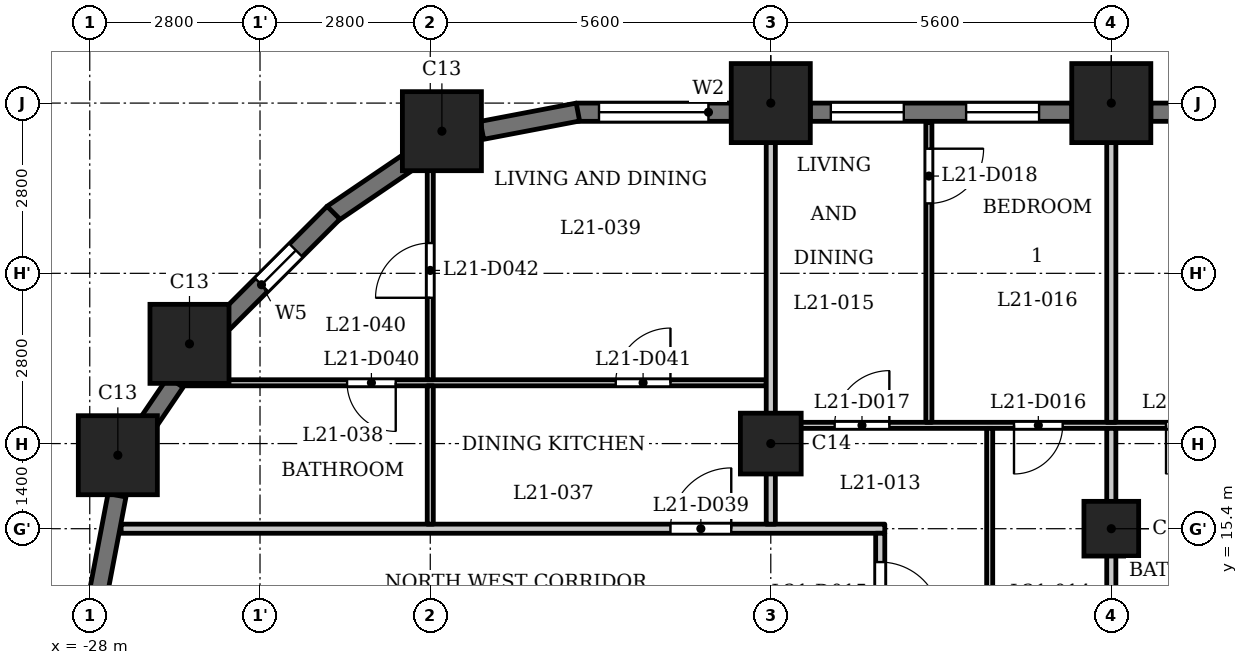
"""IFC4 building model, lengths in metres.
Left out: names, types, materials, properties, quantities, classifications, styles, units other than length and angle.
Written with IfcOpenShell. Run it as: python <this file> out.ifc"""

import sys

from ifc_helpers import new_model, si_unit, direction, frame, frame_2d, origin, origin_2d, place, context, subcontext, project, spatial, rectangle, extrude, element, fill, save


model = new_model("IFC4")
c1 = context("Model", 3, precision=1e-05, world=origin(), true_north=direction((0.0, 1.0)))
c2 = subcontext(c1, "Body", "Model", "MODEL_VIEW")
j1 = project(units=[si_unit("LENGTHUNIT", "METRE"), si_unit("PLANEANGLEUNIT", "RADIAN")], contexts=[c1])
p1 = place(None, origin())
s1 = spatial("IfcSite", under=j1, at=p1, CompositionType="ELEMENT")
p2 = place(p1, origin())
s2 = spatial("IfcBuilding", under=s1, at=p2, CompositionType="ELEMENT")
p3 = place(p2, frame((0.0, 0.0, 86.8)))
s3 = spatial("IfcBuildingStorey", under=s2, at=p3, CompositionType="ELEMENT", Elevation=86.8)
for number, where, z_axis, x_axis in (
    (1, (-11.2, 22.4, 0.0), (0.0, 0.0, 1.0), (1.0, 0.0, 0.0)),
    (2, (-16.8, 22.4, 0.0), (0.0, 0.0, 1.0), (1.0, 0.0, 0.0)),
    (3, (-22.209, 21.938, 0.0), (0.0, 0.0, 1.0), (1.0, 0.0, 0.0)),
    (4, (-26.36, 18.44, 0.0), (0.0, 0.0, 1.0), (1.0, 0.0, 0.0)),
    (5, (-27.538, 16.609, 0.0), (0.0, 0.0, 1.0), (1.0, 0.0, 0.0)),
):
    element("IfcColumn", number, at=place(p3, frame(where, z_axis=z_axis, x_axis=x_axis)), inside=s3, PredefinedType="COLUMN", context=c2, shape_type="SweptSolid", body=[
        extrude(rectangle(XDim=1.3, YDim=1.3, at=origin_2d()), origin(), (0.0, 0.0, 1.0), 3.5),
    ])
p4 = place(p3, frame((-16.8, 16.8, 0.0), z_axis=(0.0, 0.0, 1.0), x_axis=(1.0, 0.0, 0.0)))
e6 = element("IfcColumn", 6, at=p4, inside=s3, PredefinedType="COLUMN", context=c2, shape_type="SweptSolid", body=[
    extrude(rectangle(XDim=1.0, YDim=1.0, at=origin_2d()), origin(), (0.0, 0.0, 1.0), 3.5),
])
p5 = place(p3, frame((-11.2, 15.4, 0.0), z_axis=(0.0, 0.0, 1.0), x_axis=(1.0, 0.0, 0.0)))
e7 = element("IfcColumn", 7, at=p5, inside=s3, PredefinedType="COLUMN", context=c2, shape_type="SweptSolid", body=[
    extrude(rectangle(XDim=0.9, YDim=0.9, at=origin_2d()), origin(), (0.0, 0.0, 1.0), 3.5),
])
p6 = place(p3, frame((-6.25, 22.25, 0.0), z_axis=(0.0, 0.0, 1.0), x_axis=(-1.0, 0.0, 0.0)))
e8 = element("IfcWall", 8, at=p6, inside=s3, PredefinedType="SOLIDWALL", context=c2, shape_type="SweptSolid", body=[
    extrude(rectangle(XDim=4.3, YDim=0.3, at=frame_2d((2.15, 0.0))), origin(), (0.0, 0.0, 1.0), 2.4),
])
p7 = place(p6, frame((0.35, 0.0, 1.2)))
e9 = element("IfcOpeningElement", 9, at=p7, cuts=e8, PredefinedType="OPENING", context=c2, shape_type="SweptSolid", body=[
    extrude(rectangle(XDim=3.6, YDim=0.95, at=frame_2d((1.8, 0.475))), frame((0.0, 0.16, 0.0), z_axis=(0.0, -1.0, 0.0), x_axis=(1.0, 0.0, 0.0)), (0.0, 0.0, 1.0), 0.32),
])
p8 = place(p3, frame((-11.85, 22.25, 0.0), z_axis=(0.0, 0.0, 1.0), x_axis=(-1.0, 0.0, 0.0)))
e10 = element("IfcWall", 10, at=p8, inside=s3, PredefinedType="SOLIDWALL", context=c2, shape_type="SweptSolid", body=[
    extrude(rectangle(XDim=4.3, YDim=0.3, at=frame_2d((2.15, 0.0))), origin(), (0.0, 0.0, 1.0), 2.4),
])
p9 = place(p8, frame((0.538, 0.0, 0.6)))
e11 = element("IfcOpeningElement", 11, at=p9, cuts=e10, PredefinedType="OPENING", context=c2, shape_type="SweptSolid", body=[
    extrude(rectangle(XDim=1.2, YDim=1.55, at=frame_2d((0.6, 0.775))), frame((0.0, 0.16, 0.0), z_axis=(0.0, -1.0, 0.0), x_axis=(1.0, 0.0, 0.0)), (0.0, 0.0, 1.0), 0.32),
])
p10 = place(p8, frame((2.762, 0.0, 0.6)))
e12 = element("IfcOpeningElement", 12, at=p10, cuts=e10, PredefinedType="OPENING", context=c2, shape_type="SweptSolid", body=[
    extrude(rectangle(XDim=1.2, YDim=1.55, at=frame_2d((0.6, 0.775))), frame((0.0, 0.16, 0.0), z_axis=(0.0, -1.0, 0.0), x_axis=(1.0, 0.0, 0.0)), (0.0, 0.0, 1.0), 0.32),
])
p11 = place(p3, frame((-17.45, 22.25, 0.0), z_axis=(0.0, 0.0, 1.0), x_axis=(-1.0, 0.0, 0.0)))
e13 = element("IfcWall", 13, at=p11, inside=s3, PredefinedType="SOLIDWALL", context=c2, shape_type="SweptSolid", body=[
    extrude(rectangle(XDim=2.55, YDim=0.3, at=frame_2d((1.275, 0.0))), origin(), (0.0, 0.0, 1.0), 2.4),
])
p12 = place(p11, frame((0.375, 0.0, 0.9)))
e14 = element("IfcOpeningElement", 14, at=p12, cuts=e13, PredefinedType="OPENING", context=c2, shape_type="SweptSolid", body=[
    extrude(rectangle(XDim=1.8, YDim=1.25, at=frame_2d((0.9, 0.625))), frame((0.0, 0.16, 0.0), z_axis=(0.0, -1.0, 0.0), x_axis=(1.0, 0.0, 0.0)), (0.0, 0.0, 1.0), 0.32),
])
for number, where, z_axis, x_axis in (
    (15, (-19.972, 22.253, 0.0), (0.0, 0.0, 1.0), (-0.982, -0.187, 0.0)),
    (16, (-22.684, 21.482, 0.0), (0.0, 0.0, 1.0), (-0.827, -0.562, 0.0)),
):
    element("IfcWall", number, at=place(p3, frame(where, z_axis=z_axis, x_axis=x_axis)), inside=s3, PredefinedType="SOLIDWALL", context=c2, shape_type="SweptSolid", body=[
        extrude(rectangle(XDim=1.606, YDim=0.3, at=frame_2d((0.803, 0.0))), origin(), (0.0, 0.0, 1.0), 2.4),
    ])
p13 = place(p3, frame((-23.991, 20.597, 0.0), z_axis=(0.0, 0.0, 1.0), x_axis=(-0.707106781187, -0.707106781187, 0.0)))
e17 = element("IfcWall", 17, at=p13, inside=s3, PredefinedType="SOLIDWALL", context=c2, shape_type="SweptSolid", body=[
    extrude(rectangle(XDim=2.55, YDim=0.3, at=frame_2d((1.275, 0.0))), origin(), (0.0, 0.0, 1.0), 2.4),
])
p14 = place(p13, frame((0.875, 0.0, 0.6)))
e18 = element("IfcOpeningElement", 18, at=p14, cuts=e17, PredefinedType="OPENING", context=c2, shape_type="SweptSolid", body=[
    extrude(rectangle(XDim=0.8, YDim=1.55, at=frame_2d((0.4, 0.775))), frame((0.0, 0.16, 0.0), z_axis=(0.0, -1.0, 0.0), x_axis=(1.0, 0.0, 0.0)), (0.0, 0.0, 1.0), 0.32),
])
p15 = place(p3, frame((-26.589, 17.81, 0.0), z_axis=(0.0, 0.0, 1.0), x_axis=(-0.562066330934, -0.827092159091, 0.0)))
e19 = element("IfcWall", 19, at=p15, inside=s3, PredefinedType="SOLIDWALL", context=c2, shape_type="SweptSolid", body=[
    extrude(rectangle(XDim=0.877, YDim=0.3, at=frame_2d((0.438, 0.0))), origin(), (0.0, 0.0, 1.0), 3.2),
])
p16 = place(p3, frame((-27.552, 15.949, 0.0), z_axis=(0.0, 0.0, 1.0), x_axis=(-0.187279751651, -0.982306619453, 0.0)))
e20 = element("IfcWall", 20, at=p16, inside=s3, PredefinedType="SOLIDWALL", context=c2, shape_type="SweptSolid", body=[
    extrude(rectangle(XDim=1.606, YDim=0.3, at=frame_2d((0.803, 0.0))), origin(), (0.0, 0.0, 1.0), 2.4),
])
p17 = place(p3, frame((-27.484, 15.4, 0.0), z_axis=(0.0, 0.0, 1.0), x_axis=(1.0, 0.0, 0.0)))
e21 = element("IfcWall", 21, at=p17, inside=s3, PredefinedType="PARTITIONING", context=c2, shape_type="SweptSolid", body=[
    extrude(rectangle(XDim=12.559, YDim=0.15, at=frame_2d((6.279, 0.0))), origin(), (0.0, 0.0, 1.0), 3.2),
])
p18 = place(p17, frame((9.034, 0.0, 0.0)))
e22 = element("IfcOpeningElement", 22, at=p18, cuts=e21, PredefinedType="OPENING", context=c2, shape_type="SweptSolid", body=[
    extrude(rectangle(XDim=1.0, YDim=2.1, at=frame_2d((0.5, 1.05))), frame((0.0, 0.085, 0.0), z_axis=(0.0, -1.0, 0.0), x_axis=(1.0, 0.0, 0.0)), (0.0, 0.0, 1.0), 0.17),
])
p19 = place(p3, frame((-16.725, 17.1, 0.0), z_axis=(0.0, 0.0, 1.0), x_axis=(1.0, 0.0, 0.0)))
e23 = element("IfcWall", 23, at=p19, inside=s3, PredefinedType="PARTITIONING", context=c2, shape_type="SweptSolid", body=[
    extrude(rectangle(XDim=33.45, YDim=0.1, at=frame_2d((16.725, 0.0))), origin(), (0.0, 0.0, 1.0), 3.2),
])
p20 = place(p19, frame((3.925, 0.0, 0.0)))
e24 = element("IfcOpeningElement", 24, at=p20, cuts=e23, PredefinedType="OPENING", context=c2, shape_type="SweptSolid", body=[
    extrude(rectangle(XDim=0.8, YDim=2.1, at=frame_2d((0.4, 1.05))), frame((0.0, 0.06, 0.0), z_axis=(0.0, -1.0, 0.0), x_axis=(1.0, 0.0, 0.0)), (0.0, 0.0, 1.0), 0.12),
])
p21 = place(p19, frame((0.975, 0.0, 0.0)))
e25 = element("IfcOpeningElement", 25, at=p21, cuts=e23, PredefinedType="OPENING", context=c2, shape_type="SweptSolid", body=[
    extrude(rectangle(XDim=0.9, YDim=2.1, at=frame_2d((0.45, 1.05))), frame((0.0, 0.06, 0.0), z_axis=(0.0, -1.0, 0.0), x_axis=(1.0, 0.0, 0.0)), (0.0, 0.0, 1.0), 0.12),
])
p22 = place(p19, frame((6.425, 0.0, 0.0)))
e26 = element("IfcOpeningElement", 26, at=p22, cuts=e23, PredefinedType="OPENING", context=c2, shape_type="SweptSolid", body=[
    extrude(rectangle(XDim=0.8, YDim=2.1, at=frame_2d((0.4, 1.05))), frame((0.0, 0.06, 0.0), z_axis=(0.0, -1.0, 0.0), x_axis=(1.0, 0.0, 0.0)), (0.0, 0.0, 1.0), 0.12),
])
p23 = place(p19, frame((8.825, 0.0, 0.0)))
e27 = element("IfcOpeningElement", 27, at=p23, cuts=e23, PredefinedType="OPENING", context=c2, shape_type="SweptSolid", body=[
    extrude(rectangle(XDim=0.9, YDim=2.1, at=frame_2d((0.45, 1.05))), frame((0.0, 0.06, 0.0), z_axis=(0.0, -1.0, 0.0), x_axis=(1.0, 0.0, 0.0)), (0.0, 0.0, 1.0), 0.12),
])
p24 = place(p19, frame((12.375, 0.0, 0.0)))
e28 = element("IfcOpeningElement", 28, at=p24, cuts=e23, PredefinedType="OPENING", context=c2, shape_type="SweptSolid", body=[
    extrude(rectangle(XDim=0.9, YDim=2.1, at=frame_2d((0.45, 1.05))), frame((0.0, 0.06, 0.0), z_axis=(0.0, -1.0, 0.0), x_axis=(1.0, 0.0, 0.0)), (0.0, 0.0, 1.0), 0.12),
])
p25 = place(p19, frame((14.425, 0.0, 0.0)))
e29 = element("IfcOpeningElement", 29, at=p25, cuts=e23, PredefinedType="OPENING", context=c2, shape_type="SweptSolid", body=[
    extrude(rectangle(XDim=0.9, YDim=2.1, at=frame_2d((0.45, 1.05))), frame((0.0, 0.06, 0.0), z_axis=(0.0, -1.0, 0.0), x_axis=(1.0, 0.0, 0.0)), (0.0, 0.0, 1.0), 0.12),
])
p26 = place(p19, frame((26.225, 0.0, 0.0)))
e30 = element("IfcOpeningElement", 30, at=p26, cuts=e23, PredefinedType="OPENING", context=c2, shape_type="SweptSolid", body=[
    extrude(rectangle(XDim=0.8, YDim=2.1, at=frame_2d((0.4, 1.05))), frame((0.0, 0.06, 0.0), z_axis=(0.0, -1.0, 0.0), x_axis=(1.0, 0.0, 0.0)), (0.0, 0.0, 1.0), 0.12),
])
p27 = place(p19, frame((23.025, 0.0, 0.0)))
e31 = element("IfcOpeningElement", 31, at=p27, cuts=e23, PredefinedType="OPENING", context=c2, shape_type="SweptSolid", body=[
    extrude(rectangle(XDim=0.9, YDim=2.1, at=frame_2d((0.45, 1.05))), frame((0.0, 0.06, 0.0), z_axis=(0.0, -1.0, 0.0), x_axis=(1.0, 0.0, 0.0)), (0.0, 0.0, 1.0), 0.12),
])
p28 = place(p19, frame((17.775, 0.0, 0.0)))
e32 = element("IfcOpeningElement", 32, at=p28, cuts=e23, PredefinedType="OPENING", context=c2, shape_type="SweptSolid", body=[
    extrude(rectangle(XDim=0.9, YDim=2.1, at=frame_2d((0.45, 1.05))), frame((0.0, 0.06, 0.0), z_axis=(0.0, -1.0, 0.0), x_axis=(1.0, 0.0, 0.0)), (0.0, 0.0, 1.0), 0.12),
])
p29 = place(p19, frame((20.025, 0.0, 0.0)))
e33 = element("IfcOpeningElement", 33, at=p29, cuts=e23, PredefinedType="OPENING", context=c2, shape_type="SweptSolid", body=[
    extrude(rectangle(XDim=0.9, YDim=2.1, at=frame_2d((0.45, 1.05))), frame((0.0, 0.06, 0.0), z_axis=(0.0, -1.0, 0.0), x_axis=(1.0, 0.0, 0.0)), (0.0, 0.0, 1.0), 0.12),
])
p30 = place(p19, frame((28.825, 0.0, 0.0)))
e34 = element("IfcOpeningElement", 34, at=p30, cuts=e23, PredefinedType="OPENING", context=c2, shape_type="SweptSolid", body=[
    extrude(rectangle(XDim=0.8, YDim=2.1, at=frame_2d((0.4, 1.05))), frame((0.0, 0.06, 0.0), z_axis=(0.0, -1.0, 0.0), x_axis=(1.0, 0.0, 0.0)), (0.0, 0.0, 1.0), 0.12),
])
p31 = place(p19, frame((31.975, 0.0, 0.0)))
e35 = element("IfcOpeningElement", 35, at=p31, cuts=e23, PredefinedType="OPENING", context=c2, shape_type="SweptSolid", body=[
    extrude(rectangle(XDim=0.9, YDim=2.1, at=frame_2d((0.45, 1.05))), frame((0.0, 0.06, 0.0), z_axis=(0.0, -1.0, 0.0), x_axis=(1.0, 0.0, 0.0)), (0.0, 0.0, 1.0), 0.12),
])
p32 = place(p3, frame((-26.554, 17.8, 0.0), z_axis=(0.0, 0.0, 1.0), x_axis=(1.0, 0.0, 0.0)))
e36 = element("IfcWall", 36, at=p32, inside=s3, PredefinedType="PARTITIONING", context=c2, shape_type="SweptSolid", body=[
    extrude(rectangle(XDim=9.679, YDim=0.1, at=frame_2d((4.84, 0.0))), origin(), (0.0, 0.0, 1.0), 3.2),
])
p33 = place(p32, frame((2.786, 0.0, 0.0)))
e37 = element("IfcOpeningElement", 37, at=p33, cuts=e36, PredefinedType="OPENING", context=c2, shape_type="SweptSolid", body=[
    extrude(rectangle(XDim=0.8, YDim=2.1, at=frame_2d((0.4, 1.05))), frame((0.0, 0.06, 0.0), z_axis=(0.0, -1.0, 0.0), x_axis=(1.0, 0.0, 0.0)), (0.0, 0.0, 1.0), 0.12),
])
p34 = place(p32, frame((7.204, 0.0, 0.0)))
e38 = element("IfcOpeningElement", 38, at=p34, cuts=e36, PredefinedType="OPENING", context=c2, shape_type="SweptSolid", body=[
    extrude(rectangle(XDim=0.9, YDim=2.1, at=frame_2d((0.45, 1.05))), frame((0.0, 0.06, 0.0), z_axis=(0.0, -1.0, 0.0), x_axis=(1.0, 0.0, 0.0)), (0.0, 0.0, 1.0), 0.12),
])
p35 = place(p3, frame((-22.4, 15.475, 0.0), z_axis=(0.0, 0.0, 1.0), x_axis=(0.0, 1.0, 0.0)))
e39 = element("IfcWall", 39, at=p35, inside=s3, PredefinedType="PARTITIONING", context=c2, shape_type="SweptSolid", body=[
    extrude(rectangle(XDim=2.275, YDim=0.1, at=frame_2d((1.137, 0.0))), origin(), (0.0, 0.0, 1.0), 3.2),
])
p36 = place(p3, frame((-22.4, 17.85, 0.0), z_axis=(0.0, 0.0, 1.0), x_axis=(0.0, 1.0, 0.0)))
e40 = element("IfcWall", 40, at=p36, inside=s3, PredefinedType="PARTITIONING", context=c2, shape_type="SweptSolid", body=[
    extrude(rectangle(XDim=3.87, YDim=0.1, at=frame_2d((1.935, 0.0))), origin(), (0.0, 0.0, 1.0), 3.2),
])
p37 = place(p36, frame((1.348, 0.0, 0.0)))
e41 = element("IfcOpeningElement", 41, at=p37, cuts=e40, PredefinedType="OPENING", context=c2, shape_type="SweptSolid", body=[
    extrude(rectangle(XDim=0.9, YDim=2.1, at=frame_2d((0.45, 1.05))), frame((0.0, 0.06, 0.0), z_axis=(0.0, -1.0, 0.0), x_axis=(1.0, 0.0, 0.0)), (0.0, 0.0, 1.0), 0.12),
])
p38 = place(p3, frame((-16.8, 15.475, 0.0), z_axis=(0.0, 0.0, 1.0), x_axis=(0.0, 1.0, 0.0)))
e42 = element("IfcWall", 42, at=p38, inside=s3, PredefinedType="PARTITIONING", context=c2, shape_type="SweptSolid", body=[
    extrude(rectangle(XDim=7.555, YDim=0.15, at=frame_2d((3.777, 0.0))), origin(), (0.0, 0.0, 1.0), 3.2),
])
p39 = place(p3, frame((-15.0, 13.275, 0.0), z_axis=(0.0, 0.0, 1.0), x_axis=(0.0, 1.0, 0.0)))
e43 = element("IfcWall", 43, at=p39, inside=s3, PredefinedType="PARTITIONING", context=c2, shape_type="SweptSolid", body=[
    extrude(rectangle(XDim=2.05, YDim=0.15, at=frame_2d((1.025, 0.0))), origin(), (0.0, 0.0, 1.0), 3.2),
])
p40 = place(p39, frame((0.576, 0.0, 0.0)))
e44 = element("IfcOpeningElement", 44, at=p40, cuts=e43, PredefinedType="OPENING", context=c2, shape_type="SweptSolid", body=[
    extrude(rectangle(XDim=1.0, YDim=2.1, at=frame_2d((0.5, 1.05))), frame((0.0, 0.085, 0.0), z_axis=(0.0, -1.0, 0.0), x_axis=(1.0, 0.0, 0.0)), (0.0, 0.0, 1.0), 0.17),
])
p41 = place(p3, frame((-14.2, 17.15, 0.0), z_axis=(0.0, 0.0, 1.0), x_axis=(0.0, 1.0, 0.0)))
e45 = element("IfcWall", 45, at=p41, inside=s3, PredefinedType="PARTITIONING", context=c2, shape_type="SweptSolid", body=[
    extrude(rectangle(XDim=4.93, YDim=0.1, at=frame_2d((2.465, 0.0))), origin(), (0.0, 0.0, 1.0), 3.2),
])
p42 = place(p41, frame((3.6, 0.0, 0.0)))
e46 = element("IfcOpeningElement", 46, at=p42, cuts=e45, PredefinedType="OPENING", context=c2, shape_type="SweptSolid", body=[
    extrude(rectangle(XDim=0.9, YDim=2.1, at=frame_2d((0.45, 1.05))), frame((0.0, 0.06, 0.0), z_axis=(0.0, -1.0, 0.0), x_axis=(1.0, 0.0, 0.0)), (0.0, 0.0, 1.0), 0.12),
])
p43 = place(p3, frame((-13.2, 13.275, 0.0), z_axis=(0.0, 0.0, 1.0), x_axis=(0.0, 1.0, 0.0)))
e47 = element("IfcWall", 47, at=p43, inside=s3, PredefinedType="PARTITIONING", context=c2, shape_type="SweptSolid", body=[
    extrude(rectangle(XDim=3.775, YDim=0.1, at=frame_2d((1.888, 0.0))), origin(), (0.0, 0.0, 1.0), 3.2),
])
p44 = place(p3, frame((-11.2, 13.275, 0.0), z_axis=(0.0, 0.0, 1.0), x_axis=(0.0, 1.0, 0.0)))
e48 = element("IfcWall", 48, at=p44, inside=s3, PredefinedType="PARTITIONING", context=c2, shape_type="SweptSolid", body=[
    extrude(rectangle(XDim=3.775, YDim=0.15, at=frame_2d((1.888, 0.0))), origin(), (0.0, 0.0, 1.0), 3.2),
])
p45 = place(p3, frame((-11.2, 17.15, 0.0), z_axis=(0.0, 0.0, 1.0), x_axis=(0.0, 1.0, 0.0)))
e49 = element("IfcWall", 49, at=p45, inside=s3, PredefinedType="PARTITIONING", context=c2, shape_type="SweptSolid", body=[
    extrude(rectangle(XDim=5.88, YDim=0.15, at=frame_2d((2.94, 0.0))), origin(), (0.0, 0.0, 1.0), 3.2),
])
p46 = place(p40, origin())
e50 = element("IfcDoor", 50, at=p46, inside=s3, OperationType="SINGLE_SWING_LEFT", PredefinedType="DOOR", context=c2, shape_type="SweptSolid", body=[
    extrude(rectangle(XDim=1.0, YDim=2.1, at=frame_2d((0.5, 1.05))), frame((0.0, 0.025, 0.0), z_axis=(0.0, -1.0, 0.0), x_axis=(1.0, 0.0, 0.0)), (0.0, 0.0, 1.0), 0.05),
])
fill(e44, e50)
p47 = place(p20, origin())
e51 = element("IfcDoor", 51, at=p47, inside=s3, OperationType="SINGLE_SWING_LEFT", PredefinedType="DOOR", context=c2, shape_type="SweptSolid", body=[
    extrude(rectangle(XDim=0.8, YDim=2.1, at=frame_2d((0.4, 1.05))), frame((0.0, 0.025, 0.0), z_axis=(0.0, -1.0, 0.0), x_axis=(1.0, 0.0, 0.0)), (0.0, 0.0, 1.0), 0.05),
])
fill(e24, e51)
p48 = place(p21, origin())
e52 = element("IfcDoor", 52, at=p48, inside=s3, OperationType="SINGLE_SWING_LEFT", PredefinedType="DOOR", context=c2, shape_type="SweptSolid", body=[
    extrude(rectangle(XDim=0.9, YDim=2.1, at=frame_2d((0.45, 1.05))), frame((0.0, 0.025, 0.0), z_axis=(0.0, -1.0, 0.0), x_axis=(1.0, 0.0, 0.0)), (0.0, 0.0, 1.0), 0.05),
])
fill(e25, e52)
p49 = place(p42, origin())
e53 = element("IfcDoor", 53, at=p49, inside=s3, OperationType="SINGLE_SWING_RIGHT", PredefinedType="DOOR", context=c2, shape_type="SweptSolid", body=[
    extrude(rectangle(XDim=0.9, YDim=2.1, at=frame_2d((0.45, 1.05))), frame((0.0, 0.025, 0.0), z_axis=(0.0, -1.0, 0.0), x_axis=(1.0, 0.0, 0.0)), (0.0, 0.0, 1.0), 0.05),
])
fill(e46, e53)
p50 = place(p22, origin())
e54 = element("IfcDoor", 54, at=p50, inside=s3, OperationType="SINGLE_SWING_LEFT", PredefinedType="DOOR", context=c2, shape_type="SweptSolid", body=[
    extrude(rectangle(XDim=0.8, YDim=2.1, at=frame_2d((0.4, 1.05))), frame((0.0, 0.025, 0.0), z_axis=(0.0, -1.0, 0.0), x_axis=(1.0, 0.0, 0.0)), (0.0, 0.0, 1.0), 0.05),
])
fill(e26, e54)
p51 = place(p18, origin())
e55 = element("IfcDoor", 55, at=p51, inside=s3, OperationType="SINGLE_SWING_LEFT", PredefinedType="DOOR", context=c2, shape_type="SweptSolid", body=[
    extrude(rectangle(XDim=1.0, YDim=2.1, at=frame_2d((0.5, 1.05))), frame((0.0, 0.025, 0.0), z_axis=(0.0, -1.0, 0.0), x_axis=(1.0, 0.0, 0.0)), (0.0, 0.0, 1.0), 0.05),
])
fill(e22, e55)
p52 = place(p33, origin())
e56 = element("IfcDoor", 56, at=p52, inside=s3, OperationType="SINGLE_SWING_RIGHT", PredefinedType="DOOR", context=c2, shape_type="SweptSolid", body=[
    extrude(rectangle(XDim=0.8, YDim=2.1, at=frame_2d((0.4, 1.05))), frame((0.0, 0.025, 0.0), z_axis=(0.0, -1.0, 0.0), x_axis=(1.0, 0.0, 0.0)), (0.0, 0.0, 1.0), 0.05),
])
fill(e37, e56)
p53 = place(p34, origin())
e57 = element("IfcDoor", 57, at=p53, inside=s3, OperationType="SINGLE_SWING_LEFT", PredefinedType="DOOR", context=c2, shape_type="SweptSolid", body=[
    extrude(rectangle(XDim=0.9, YDim=2.1, at=frame_2d((0.45, 1.05))), frame((0.0, 0.025, 0.0), z_axis=(0.0, -1.0, 0.0), x_axis=(1.0, 0.0, 0.0)), (0.0, 0.0, 1.0), 0.05),
])
fill(e38, e57)
p54 = place(p37, origin())
e58 = element("IfcDoor", 58, at=p54, inside=s3, OperationType="SINGLE_SWING_RIGHT", PredefinedType="DOOR", context=c2, shape_type="SweptSolid", body=[
    extrude(rectangle(XDim=0.9, YDim=2.1, at=frame_2d((0.45, 1.05))), frame((0.0, 0.025, 0.0), z_axis=(0.0, -1.0, 0.0), x_axis=(1.0, 0.0, 0.0)), (0.0, 0.0, 1.0), 0.05),
])
fill(e41, e58)
p55 = place(p9, origin())
e59 = element("IfcWindow", 59, at=p55, inside=s3, PartitioningType="SINGLE_PANEL", PredefinedType="WINDOW", context=c2, shape_type="SweptSolid", body=[
    extrude(rectangle(XDim=1.2, YDim=1.55, at=frame_2d((0.6, 0.775))), frame((0.0, 0.03, 0.0), z_axis=(0.0, -1.0, 0.0), x_axis=(1.0, 0.0, 0.0)), (0.0, 0.0, 1.0), 0.06),
])
fill(e11, e59)
p56 = place(p10, origin())
e60 = element("IfcWindow", 60, at=p56, inside=s3, PartitioningType="SINGLE_PANEL", PredefinedType="WINDOW", context=c2, shape_type="SweptSolid", body=[
    extrude(rectangle(XDim=1.2, YDim=1.55, at=frame_2d((0.6, 0.775))), frame((0.0, 0.03, 0.0), z_axis=(0.0, -1.0, 0.0), x_axis=(1.0, 0.0, 0.0)), (0.0, 0.0, 1.0), 0.06),
])
fill(e12, e60)
p57 = place(p12, origin())
e61 = element("IfcWindow", 61, at=p57, inside=s3, PartitioningType="SINGLE_PANEL", PredefinedType="WINDOW", context=c2, shape_type="SweptSolid", body=[
    extrude(rectangle(XDim=1.8, YDim=1.25, at=frame_2d((0.9, 0.625))), frame((0.0, 0.03, 0.0), z_axis=(0.0, -1.0, 0.0), x_axis=(1.0, 0.0, 0.0)), (0.0, 0.0, 1.0), 0.06),
])
fill(e14, e61)
p58 = place(p14, origin())
e62 = element("IfcWindow", 62, at=p58, inside=s3, PartitioningType="SINGLE_PANEL", PredefinedType="WINDOW", context=c2, shape_type="SweptSolid", body=[
    extrude(rectangle(XDim=0.8, YDim=1.55, at=frame_2d((0.4, 0.775))), frame((0.0, 0.03, 0.0), z_axis=(0.0, -1.0, 0.0), x_axis=(1.0, 0.0, 0.0)), (0.0, 0.0, 1.0), 0.06),
])
fill(e18, e62)
save(model, sys.argv[1])
